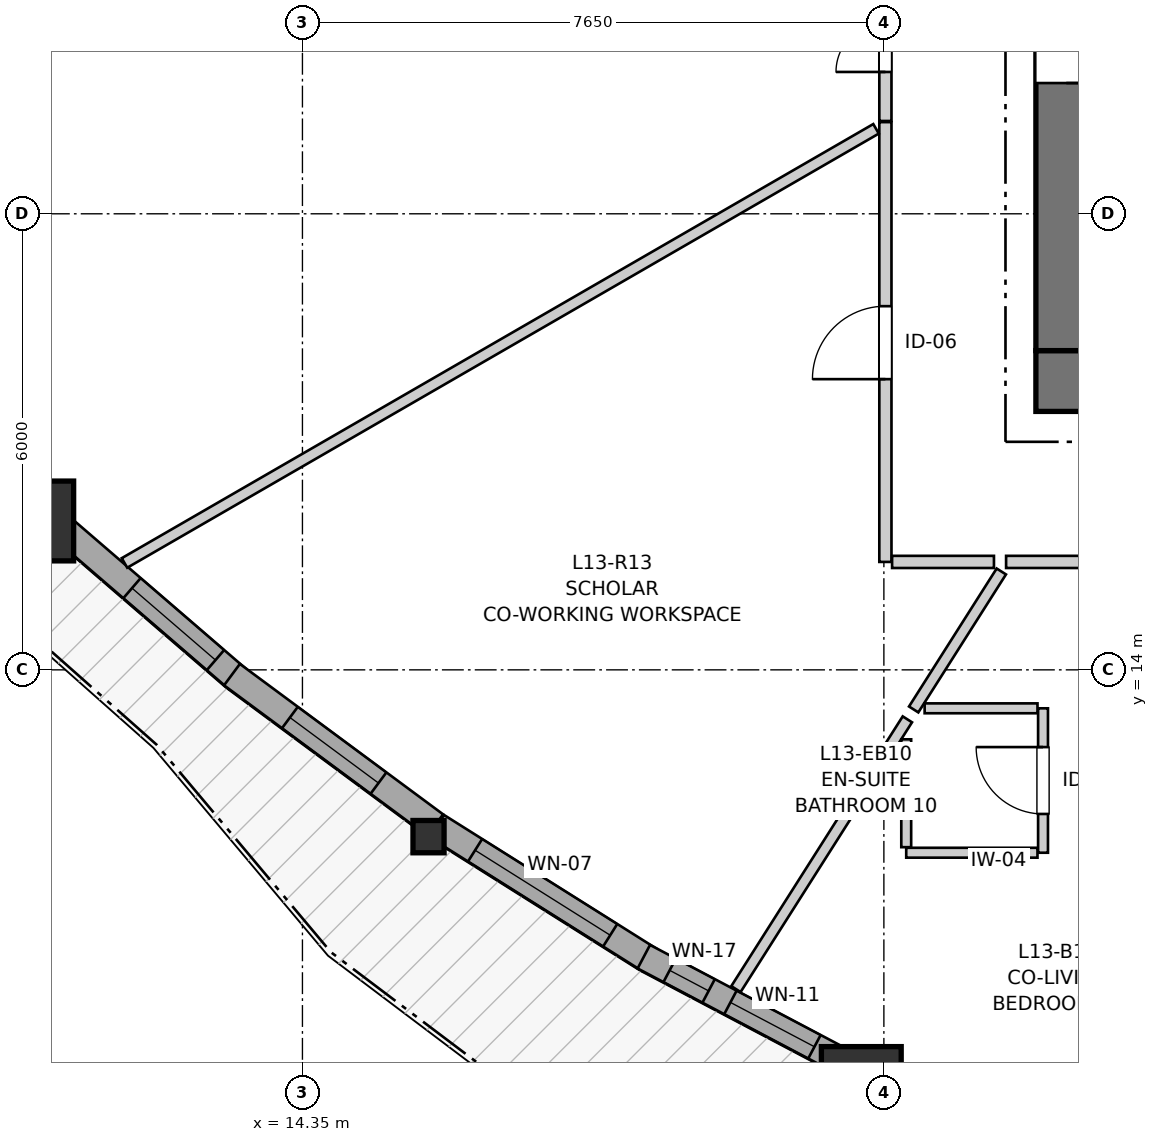
"""IFC4 building model, lengths in metres.
Left out: names, types, materials, properties, quantities, classifications, styles, units other than length and angle.
Written with IfcOpenShell. Run it as: python <this file> out.ifc"""

import sys

from ifc_helpers import new_model, si_unit, direction, frame, frame_2d, origin, origin_2d, place, context, subcontext, project, spatial, rectangle, i_section, extrude, source, transform, mapped, element, fill, save


model = new_model("IFC4")
c1 = context("Model", 3, precision=1e-05, world=origin(), true_north=direction((0.0, 1.0)))
c2 = subcontext(c1, "Body", "Model", "MODEL_VIEW")
j1 = project(units=[si_unit("LENGTHUNIT", "METRE"), si_unit("PLANEANGLEUNIT", "RADIAN")], contexts=[c1])
p1 = place(None, origin())
s1 = spatial("IfcSite", under=j1, at=p1, CompositionType="ELEMENT")
p2 = place(p1, origin())
s2 = spatial("IfcBuilding", under=s1, at=p2, CompositionType="ELEMENT")
p3 = place(p2, frame((0.0, 0.0, 46.2)))
s3 = spatial("IfcBuildingStorey", under=s2, at=p3, CompositionType="ELEMENT", Elevation=46.2)
p4 = place(p3, frame((24.0, 17.8, 0.0), z_axis=(0.0, 0.0, 1.0), x_axis=(1.0, 0.0, 0.0)))
e1 = element("IfcWall", 1, at=p4, inside=s3, PredefinedType="SHEAR", context=c2, shape_type="SweptSolid", body=[
    extrude(rectangle(XDim=12.7, YDim=0.8, at=frame_2d((6.35, 0.0))), origin(), (0.0, 0.0, 1.0), 2.94),
])
p5 = place(p3, frame((24.4, 33.8, 0.0), z_axis=(0.0, 0.0, 1.0), x_axis=(0.0, -1.0, 0.0)))
e2 = element("IfcWall", 2, at=p5, inside=s3, PredefinedType="SHEAR", context=c2, shape_type="SweptSolid", body=[
    extrude(rectangle(XDim=15.6, YDim=0.8, at=frame_2d((7.8, 0.0))), origin(), (0.0, 0.0, 1.0), 2.94),
])
p6 = place(p5, frame((7.05, 0.0, 0.0)))
e3 = element("IfcOpeningElement", 3, at=p6, cuts=e2, PredefinedType="OPENING", context=c2, shape_type="SweptSolid", body=[
    extrude(rectangle(XDim=1.5, YDim=2.15, at=frame_2d((0.75, 1.075))), frame((0.0, 0.41, 0.0), z_axis=(0.0, -1.0, 0.0), x_axis=(1.0, 0.0, 0.0)), (0.0, 0.0, 1.0), 0.82),
])
p7 = place(p5, frame((3.52, 0.0, 0.0)))
e4 = element("IfcOpeningElement", 4, at=p7, cuts=e2, PredefinedType="OPENING", context=c2, shape_type="SweptSolid", body=[
    extrude(rectangle(XDim=0.86, YDim=2.05, at=frame_2d((0.43, 1.025))), frame((0.0, 0.41, 0.0), z_axis=(0.0, -1.0, 0.0), x_axis=(1.0, 0.0, 0.0)), (0.0, 0.0, 1.0), 0.82),
])
p8 = place(p5, frame((11.22, 0.0, 0.0)))
e5 = element("IfcOpeningElement", 5, at=p8, cuts=e2, PredefinedType="OPENING", context=c2, shape_type="SweptSolid", body=[
    extrude(rectangle(XDim=0.86, YDim=2.05, at=frame_2d((0.43, 1.025))), frame((0.0, 0.41, 0.0), z_axis=(0.0, -1.0, 0.0), x_axis=(1.0, 0.0, 0.0)), (0.0, 0.0, 1.0), 0.82),
])
m1 = source(origin(), c2, "Body", "SweptSolid", [
    extrude(rectangle(XDim=1.05, YDim=1.05, at=origin_2d()), origin(), (0.0, 0.0, 1.0), 2.94),
])
p9 = place(p3, frame((10.815, 15.958, 0.0), z_axis=(0.0, 0.0, 1.0), x_axis=(1.0, 0.0, 0.0)))
e6 = element("IfcColumn", 6, at=p9, inside=s3, PredefinedType="COLUMN", context=c2, shape_type="MappedRepresentation", body=[
    mapped(m1, transform((0.0, 0.0, 0.0), x_axis=(1.0, 0.0, 0.0), y_axis=(0.0, 1.0, 0.0), z_axis=(0.0, 0.0, 1.0), scale=1.0)),
])
m2 = source(origin(), c2, "Body", "SweptSolid", [
    extrude(i_section(OverallWidth=0.409, OverallDepth=0.425, WebThickness=0.03, FlangeThickness=0.048, FilletRadius=0.015, at=origin_2d()), origin(), (0.0, 0.0, 1.0), 2.94),
])
p10 = place(p3, frame((16.009, 11.806, 0.0), z_axis=(0.0, 0.0, 1.0), x_axis=(1.0, 0.0, 0.0)))
e7 = element("IfcColumn", 7, at=p10, inside=s3, PredefinedType="PILASTER", context=c2, shape_type="MappedRepresentation", body=[
    mapped(m2, transform((0.0, 0.0, 0.0), x_axis=(1.0, 0.0, 0.0), y_axis=(0.0, 1.0, 0.0), z_axis=(0.0, 0.0, 1.0), scale=1.0)),
])
p11 = place(p3, frame((21.703, 8.518, 0.0), z_axis=(0.0, 0.0, 1.0), x_axis=(1.0, 0.0, 0.0)))
e8 = element("IfcColumn", 8, at=p11, inside=s3, PredefinedType="COLUMN", context=c2, shape_type="MappedRepresentation", body=[
    mapped(m1, transform((0.0, 0.0, 0.0), x_axis=(1.0, 0.0, 0.0), y_axis=(0.0, 1.0, 0.0), z_axis=(0.0, 0.0, 1.0), scale=1.0)),
])
p12 = place(p3, frame((11.156, 15.895, 0.0), z_axis=(0.0, 0.0, 1.0), x_axis=(0.757493652432, -0.652842528123, 0.0)))
e9 = element("IfcWall", 9, at=p12, inside=s3, PredefinedType="SOLIDWALL", context=c2, shape_type="SweptSolid", body=[
    extrude(rectangle(XDim=3.084, YDim=0.35, at=frame_2d((1.542, 0.0))), origin(), (0.0, 0.0, 1.0), 2.42),
])
p13 = place(p12, frame((1.256, 0.0, 0.82)))
e10 = element("IfcOpeningElement", 10, at=p13, cuts=e9, PredefinedType="OPENING", context=c2, shape_type="SweptSolid", body=[
    extrude(rectangle(XDim=1.45, YDim=1.25, at=frame_2d((0.725, 0.625))), frame((0.0, 0.185, 0.0), z_axis=(0.0, -1.0, 0.0), x_axis=(1.0, 0.0, 0.0)), (0.0, 0.0, 1.0), 0.37),
])
p14 = place(p3, frame((13.423, 13.937, 0.0), z_axis=(0.0, 0.0, 1.0), x_axis=(0.803814527371, -0.594879992593, 0.0)))
e11 = element("IfcWall", 11, at=p14, inside=s3, PredefinedType="SOLIDWALL", context=c2, shape_type="SweptSolid", body=[
    extrude(rectangle(XDim=3.327, YDim=0.35, at=frame_2d((1.663, 0.0))), origin(), (0.0, 0.0, 1.0), 2.42),
])
p15 = place(p14, frame((0.948, 0.0, 0.82)))
e12 = element("IfcOpeningElement", 12, at=p15, cuts=e11, PredefinedType="OPENING", context=c2, shape_type="SweptSolid", body=[
    extrude(rectangle(XDim=1.45, YDim=1.25, at=frame_2d((0.725, 0.625))), frame((0.0, 0.185, 0.0), z_axis=(0.0, -1.0, 0.0), x_axis=(1.0, 0.0, 0.0)), (0.0, 0.0, 1.0), 0.37),
])
p16 = place(p3, frame((16.119, 11.943, 0.0), z_axis=(0.0, 0.0, 1.0), x_axis=(0.846439828925, -0.532484381, 0.0)))
e13 = element("IfcWall", 13, at=p16, inside=s3, PredefinedType="SOLIDWALL", context=c2, shape_type="SweptSolid", body=[
    extrude(rectangle(XDim=3.308, YDim=0.35, at=frame_2d((1.654, 0.0))), origin(), (0.0, 0.0, 1.0), 2.42),
])
p17 = place(p16, frame((0.594, 0.0, 0.82)))
e14 = element("IfcOpeningElement", 14, at=p17, cuts=e13, PredefinedType="OPENING", context=c2, shape_type="SweptSolid", body=[
    extrude(rectangle(XDim=2.1, YDim=1.4, at=frame_2d((1.05, 0.7))), frame((0.0, 0.185, 0.0), z_axis=(0.0, -1.0, 0.0), x_axis=(1.0, 0.0, 0.0)), (0.0, 0.0, 1.0), 0.37),
])
p18 = place(p3, frame((18.842, 10.226, 0.0), z_axis=(0.0, 0.0, 1.0), x_axis=(0.884373657766, -0.466779641211, 0.0)))
e15 = element("IfcWall", 15, at=p18, inside=s3, PredefinedType="SOLIDWALL", context=c2, shape_type="SweptSolid", body=[
    extrude(rectangle(XDim=3.028, YDim=0.35, at=frame_2d((1.514, 0.0))), origin(), (0.0, 0.0, 1.0), 2.42),
])
p19 = place(p18, frame((0.384, 0.0, 0.82)))
e16 = element("IfcOpeningElement", 16, at=p19, cuts=e15, PredefinedType="OPENING", context=c2, shape_type="SweptSolid", body=[
    extrude(rectangle(XDim=0.58, YDim=1.35, at=frame_2d((0.29, 0.675))), frame((0.0, 0.185, 0.0), z_axis=(0.0, -1.0, 0.0), x_axis=(1.0, 0.0, 0.0)), (0.0, 0.0, 1.0), 0.37),
])
p20 = place(p18, frame((1.288, 0.0, 0.82)))
e17 = element("IfcOpeningElement", 17, at=p20, cuts=e15, PredefinedType="OPENING", context=c2, shape_type="SweptSolid", body=[
    extrude(rectangle(XDim=1.25, YDim=1.35, at=frame_2d((0.625, 0.675))), frame((0.0, 0.185, 0.0), z_axis=(0.0, -1.0, 0.0), x_axis=(1.0, 0.0, 0.0)), (0.0, 0.0, 1.0), 0.37),
])
p21 = place(p3, frame((22.02, 15.42, 0.0), z_axis=(0.0, 0.0, 1.0), x_axis=(0.0, 1.0, 0.0)))
e18 = element("IfcWall", 18, at=p21, inside=s3, PredefinedType="PARTITIONING", context=c2, shape_type="SweptSolid", body=[
    extrude(rectangle(XDim=5.786, YDim=0.16, at=frame_2d((2.893, 0.0))), origin(), (0.0, 0.0, 1.0), 2.94),
])
p22 = place(p21, frame((2.405, 0.0, 0.0)))
e19 = element("IfcOpeningElement", 19, at=p22, cuts=e18, PredefinedType="OPENING", context=c2, shape_type="SweptSolid", body=[
    extrude(rectangle(XDim=0.96, YDim=2.1, at=frame_2d((0.48, 1.05))), frame((0.0, 0.09, 0.0), z_axis=(0.0, -1.0, 0.0), x_axis=(1.0, 0.0, 0.0)), (0.0, 0.0, 1.0), 0.18),
])
p23 = place(p3, frame((27.544, 15.42, 0.0), z_axis=(0.0, 0.0, 1.0), x_axis=(-1.0, 0.0, 0.0)))
e20 = element("IfcWall", 20, at=p23, inside=s3, PredefinedType="PARTITIONING", context=c2, shape_type="SweptSolid", body=[
    extrude(rectangle(XDim=3.936, YDim=0.16, at=frame_2d((1.968, 0.0))), origin(), (0.0, 0.0, 1.0), 2.94),
])
p24 = place(p23, frame((1.507, 0.0, 0.0)))
e21 = element("IfcOpeningElement", 21, at=p24, cuts=e20, PredefinedType="OPENING", context=c2, shape_type="SweptSolid", body=[
    extrude(rectangle(XDim=0.92, YDim=2.1, at=frame_2d((0.46, 1.05))), frame((0.0, 0.09, 0.0), z_axis=(0.0, -1.0, 0.0), x_axis=(1.0, 0.0, 0.0)), (0.0, 0.0, 1.0), 0.18),
])
p25 = place(p3, frame((22.02, 21.221, 0.0), z_axis=(0.0, 0.0, 1.0), x_axis=(0.0, 1.0, 0.0)))
e22 = element("IfcWall", 22, at=p25, inside=s3, PredefinedType="PARTITIONING", context=c2, shape_type="SweptSolid", body=[
    extrude(rectangle(XDim=2.929, YDim=0.16, at=frame_2d((1.464, 0.0))), origin(), (0.0, 0.0, 1.0), 2.94),
])
p26 = place(p25, frame((0.645, 0.0, 0.0)))
e23 = element("IfcOpeningElement", 23, at=p26, cuts=e22, PredefinedType="OPENING", context=c2, shape_type="SweptSolid", body=[
    extrude(rectangle(XDim=1.3, YDim=2.1, at=frame_2d((0.65, 1.05))), frame((0.0, 0.09, 0.0), z_axis=(0.0, -1.0, 0.0), x_axis=(1.0, 0.0, 0.0)), (0.0, 0.0, 1.0), 0.18),
])
p27 = place(p3, frame((24.094, 11.594, 0.0), z_axis=(0.0, 0.0, 1.0), x_axis=(0.0, 1.0, 0.0)))
e24 = element("IfcWall", 24, at=p27, inside=s3, PredefinedType="PARTITIONING", context=c2, shape_type="SweptSolid", body=[
    extrude(rectangle(XDim=1.9, YDim=0.13, at=frame_2d((0.95, 0.0))), origin(), (0.0, 0.0, 1.0), 2.94),
])
p28 = place(p27, frame((0.51, 0.0, 0.0)))
e25 = element("IfcOpeningElement", 25, at=p28, cuts=e24, PredefinedType="OPENING", context=c2, shape_type="SweptSolid", body=[
    extrude(rectangle(XDim=0.88, YDim=2.05, at=frame_2d((0.44, 1.025))), frame((0.0, 0.075, 0.0), z_axis=(0.0, -1.0, 0.0), x_axis=(1.0, 0.0, 0.0)), (0.0, 0.0, 1.0), 0.15),
])
p29 = place(p3, frame((12.009, 15.406, 0.0), z_axis=(0.0, 0.0, 1.0), x_axis=(0.865925986209, 0.500172156771, 0.0)))
e26 = element("IfcWall", 26, at=p29, inside=s3, PredefinedType="PARTITIONING", context=c2, shape_type="SweptSolid", body=[
    extrude(rectangle(XDim=11.419, YDim=0.145, at=frame_2d((5.709, 0.0))), origin(), (0.0, 0.0, 1.0), 2.94),
])
p30 = place(p3, frame((20.054, 9.8, 0.0), z_axis=(0.0, 0.0, 1.0), x_axis=(0.536345686693, 0.843998403059, 0.0)))
e27 = element("IfcWall", 27, at=p30, inside=s3, PredefinedType="PARTITIONING", context=c2, shape_type="SweptSolid", body=[
    extrude(rectangle(XDim=4.205, YDim=0.145, at=frame_2d((2.103, 0.0))), origin(), (0.0, 0.0, 1.0), 2.94),
])
p31 = place(p3, frame((22.392, 13.479, 0.0), z_axis=(0.0, 0.0, 1.0), x_axis=(0.53614810629, 0.844123929362, 0.0)))
e28 = element("IfcWall", 28, at=p31, inside=s3, PredefinedType="PARTITIONING", context=c2, shape_type="SweptSolid", body=[
    extrude(rectangle(XDim=2.151, YDim=0.145, at=frame_2d((1.075, 0.0))), origin(), (0.0, 0.0, 1.0), 2.94),
])
p32 = place(p3, frame((22.294, 11.594, 0.0), z_axis=(0.0, 0.0, 1.0), x_axis=(1.0, 0.0, 0.0)))
e29 = element("IfcWall", 29, at=p32, inside=s3, PredefinedType="PARTITIONING", context=c2, shape_type="SweptSolid", body=[
    extrude(rectangle(XDim=1.727, YDim=0.13, at=frame_2d((0.864, 0.0))), origin(), (0.0, 0.0, 1.0), 2.94),
])
p33 = place(p3, frame((22.294, 11.667, 0.0), z_axis=(0.0, 0.0, 1.0), x_axis=(0.0, 1.0, 0.0)))
e30 = element("IfcWall", 30, at=p33, inside=s3, PredefinedType="PARTITIONING", context=c2, shape_type="SweptSolid", body=[
    extrude(rectangle(XDim=1.419, YDim=0.13, at=frame_2d((0.709, 0.0))), origin(), (0.0, 0.0, 1.0), 2.94),
])
p34 = place(p3, frame((22.536, 13.494, 0.0), z_axis=(0.0, 0.0, 1.0), x_axis=(1.0, 0.0, 0.0)))
e31 = element("IfcWall", 31, at=p34, inside=s3, PredefinedType="PARTITIONING", context=c2, shape_type="SweptSolid", body=[
    extrude(rectangle(XDim=1.485, YDim=0.13, at=frame_2d((0.742, 0.0))), origin(), (0.0, 0.0, 1.0), 2.94),
])
p35 = place(p3, frame((22.108, 15.42, 0.0), z_axis=(0.0, 0.0, 1.0), x_axis=(1.0, 0.0, 0.0)))
e32 = element("IfcWall", 32, at=p35, inside=s3, PredefinedType="PARTITIONING", context=c2, shape_type="SweptSolid", body=[
    extrude(rectangle(XDim=1.34, YDim=0.16, at=frame_2d((0.67, 0.0))), origin(), (0.0, 0.0, 1.0), 2.94),
])
m3 = source(origin(), c2, "Body", "SweptSolid", [
    extrude(rectangle(XDim=1.45, YDim=1.25, at=frame_2d((0.725, 0.625))), frame((0.0, 0.03, 0.0), z_axis=(0.0, -1.0, 0.0), x_axis=(1.0, 0.0, 0.0)), (0.0, 0.0, 1.0), 0.06),
])
p36 = place(p13, origin())
e33 = element("IfcWindow", 33, at=p36, inside=s3, PartitioningType="SINGLE_PANEL", PredefinedType="WINDOW", context=c2, shape_type="MappedRepresentation", body=[
    mapped(m3, transform((0.0, 0.0, 0.0), x_axis=(1.0, 0.0, 0.0), y_axis=(0.0, 1.0, 0.0), z_axis=(0.0, 0.0, 1.0), scale=1.0)),
])
fill(e10, e33)
p37 = place(p15, origin())
e34 = element("IfcWindow", 34, at=p37, inside=s3, PartitioningType="SINGLE_PANEL", PredefinedType="WINDOW", context=c2, shape_type="MappedRepresentation", body=[
    mapped(m3, transform((0.0, 0.0, 0.0), x_axis=(1.0, 0.0, 0.0), y_axis=(0.0, 1.0, 0.0), z_axis=(0.0, 0.0, 1.0), scale=1.0)),
])
fill(e12, e34)
m4 = source(origin(), c2, "Body", "SweptSolid", [
    extrude(rectangle(XDim=2.1, YDim=1.4, at=frame_2d((1.05, 0.7))), frame((0.0, 0.03, 0.0), z_axis=(0.0, -1.0, 0.0), x_axis=(1.0, 0.0, 0.0)), (0.0, 0.0, 1.0), 0.06),
])
p38 = place(p17, origin())
e35 = element("IfcWindow", 35, at=p38, inside=s3, PartitioningType="SINGLE_PANEL", PredefinedType="WINDOW", context=c2, shape_type="MappedRepresentation", body=[
    mapped(m4, transform((0.0, 0.0, 0.0), x_axis=(1.0, 0.0, 0.0), y_axis=(0.0, 1.0, 0.0), z_axis=(0.0, 0.0, 1.0), scale=1.0)),
])
fill(e14, e35)
m5 = source(origin(), c2, "Body", "SweptSolid", [
    extrude(rectangle(XDim=0.58, YDim=1.35, at=frame_2d((0.29, 0.675))), frame((0.0, 0.03, 0.0), z_axis=(0.0, -1.0, 0.0), x_axis=(1.0, 0.0, 0.0)), (0.0, 0.0, 1.0), 0.06),
])
p39 = place(p19, origin())
e36 = element("IfcWindow", 36, at=p39, inside=s3, PartitioningType="SINGLE_PANEL", PredefinedType="WINDOW", context=c2, shape_type="MappedRepresentation", body=[
    mapped(m5, transform((0.0, 0.0, 0.0), x_axis=(1.0, 0.0, 0.0), y_axis=(0.0, 1.0, 0.0), z_axis=(0.0, 0.0, 1.0), scale=1.0)),
])
fill(e16, e36)
m6 = source(origin(), c2, "Body", "SweptSolid", [
    extrude(rectangle(XDim=1.25, YDim=1.35, at=frame_2d((0.625, 0.675))), frame((0.0, 0.03, 0.0), z_axis=(0.0, -1.0, 0.0), x_axis=(1.0, 0.0, 0.0)), (0.0, 0.0, 1.0), 0.06),
])
p40 = place(p20, origin())
e37 = element("IfcWindow", 37, at=p40, inside=s3, PartitioningType="SINGLE_PANEL", PredefinedType="WINDOW", context=c2, shape_type="MappedRepresentation", body=[
    mapped(m6, transform((0.0, 0.0, 0.0), x_axis=(1.0, 0.0, 0.0), y_axis=(0.0, 1.0, 0.0), z_axis=(0.0, 0.0, 1.0), scale=1.0)),
])
fill(e17, e37)
m7 = source(origin(), c2, "Body", "SweptSolid", [
    extrude(rectangle(XDim=0.86, YDim=2.05, at=frame_2d((0.43, 1.025))), frame((0.0, 0.025, 0.0), z_axis=(0.0, -1.0, 0.0), x_axis=(1.0, 0.0, 0.0)), (0.0, 0.0, 1.0), 0.05),
])
p41 = place(p8, origin())
e38 = element("IfcDoor", 38, at=p41, inside=s3, OperationType="SINGLE_SWING_RIGHT", PredefinedType="DOOR", context=c2, shape_type="MappedRepresentation", body=[
    mapped(m7, transform((0.0, 0.0, 0.0), x_axis=(1.0, 0.0, 0.0), y_axis=(0.0, 1.0, 0.0), z_axis=(0.0, 0.0, 1.0), scale=1.0)),
])
fill(e5, e38)
m8 = source(origin(), c2, "Body", "SweptSolid", [
    extrude(rectangle(XDim=0.96, YDim=2.1, at=frame_2d((0.48, 1.05))), frame((0.0, 0.025, 0.0), z_axis=(0.0, -1.0, 0.0), x_axis=(1.0, 0.0, 0.0)), (0.0, 0.0, 1.0), 0.05),
])
p42 = place(p22, origin())
e39 = element("IfcDoor", 39, at=p42, inside=s3, OperationType="SINGLE_SWING_LEFT", PredefinedType="DOOR", context=c2, shape_type="MappedRepresentation", body=[
    mapped(m8, transform((0.0, 0.0, 0.0), x_axis=(1.0, 0.0, 0.0), y_axis=(0.0, 1.0, 0.0), z_axis=(0.0, 0.0, 1.0), scale=1.0)),
])
fill(e19, e39)
m9 = source(origin(), c2, "Body", "SweptSolid", [
    extrude(rectangle(XDim=1.3, YDim=2.1, at=frame_2d((0.65, 1.05))), frame((0.0, 0.025, 0.0), z_axis=(0.0, -1.0, 0.0), x_axis=(1.0, 0.0, 0.0)), (0.0, 0.0, 1.0), 0.05),
])
p43 = place(p26, origin())
e40 = element("IfcDoor", 40, at=p43, inside=s3, OperationType="DOUBLE_DOOR_SINGLE_SWING", PredefinedType="DOOR", context=c2, shape_type="MappedRepresentation", body=[
    mapped(m9, transform((0.0, 0.0, 0.0), x_axis=(1.0, 0.0, 0.0), y_axis=(0.0, 1.0, 0.0), z_axis=(0.0, 0.0, 1.0), scale=1.0)),
])
fill(e23, e40)
m10 = source(origin(), c2, "Body", "SweptSolid", [
    extrude(rectangle(XDim=0.88, YDim=2.05, at=frame_2d((0.44, 1.025))), frame((0.0, 0.025, 0.0), z_axis=(0.0, -1.0, 0.0), x_axis=(1.0, 0.0, 0.0)), (0.0, 0.0, 1.0), 0.05),
])
p44 = place(p28, origin())
e41 = element("IfcDoor", 41, at=p44, inside=s3, OperationType="SINGLE_SWING_RIGHT", PredefinedType="DOOR", context=c2, shape_type="MappedRepresentation", body=[
    mapped(m10, transform((0.0, 0.0, 0.0), x_axis=(1.0, 0.0, 0.0), y_axis=(0.0, 1.0, 0.0), z_axis=(0.0, 0.0, 1.0), scale=1.0)),
])
fill(e25, e41)
save(model, sys.argv[1])
